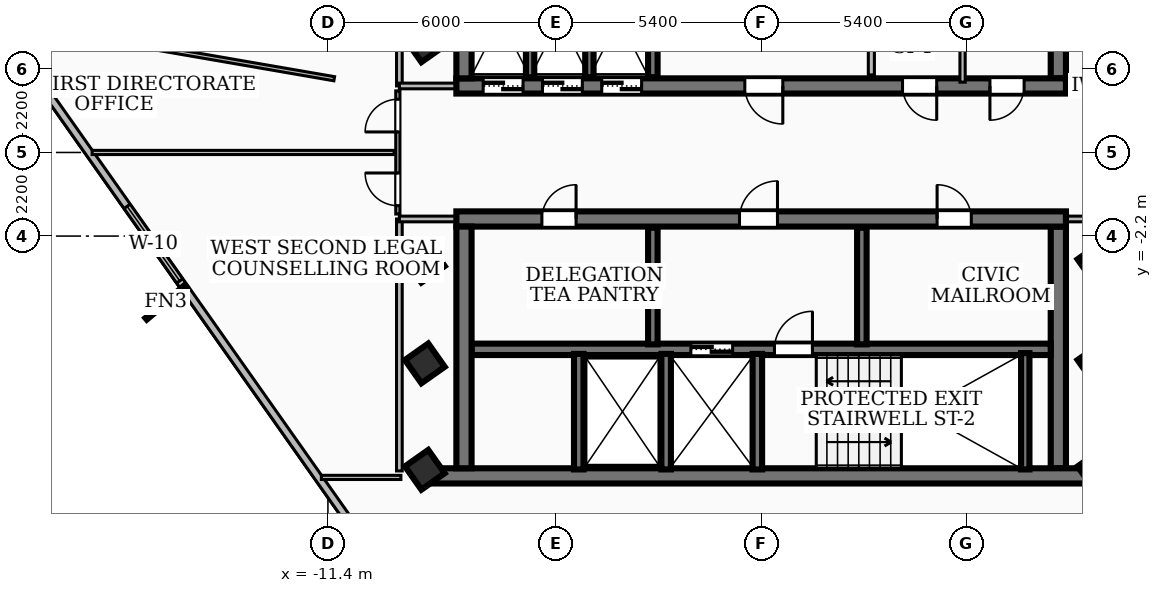
"""IFC4 building model, lengths in metres.
Left out: names, types, materials, properties, quantities, classifications, styles, units other than length and angle.
Written with IfcOpenShell. Run it as: python <this file> out.ifc"""

import sys

from ifc_helpers import new_model, si_unit, direction, frame, frame_2d, origin, origin_2d, place, context, subcontext, project, spatial, rectangle, extrude, element, fill, save


model = new_model("IFC4")
c1 = context("Model", 3, precision=1e-05, world=origin(), true_north=direction((0.0, 1.0)))
c2 = subcontext(c1, "Body", "Model", "MODEL_VIEW")
j1 = project(units=[si_unit("LENGTHUNIT", "METRE"), si_unit("PLANEANGLEUNIT", "RADIAN")], contexts=[c1])
p1 = place(None, origin())
s1 = spatial("IfcSite", under=j1, at=p1, CompositionType="ELEMENT")
p2 = place(p1, origin())
s2 = spatial("IfcBuilding", under=s1, at=p2, CompositionType="ELEMENT")
p3 = place(p2, frame((0.0, 0.0, 225.72)))
s3 = spatial("IfcBuildingStorey", under=s2, at=p3, CompositionType="ELEMENT", Elevation=225.72)
p4 = place(p3, frame((8.02, 1.75, 0.0), z_axis=(0.0, 0.0, 1.0), x_axis=(-1.0, 0.0, 0.0)))
e1 = element("IfcWall", 1, at=p4, inside=s3, PredefinedType="SHEAR", context=c2, shape_type="SweptSolid", body=[
    extrude(rectangle(XDim=16.04, YDim=0.4, at=frame_2d((8.02, 0.0))), origin(), (0.0, 0.0, 1.0), 3.14),
])
p5 = place(p4, frame((7.45, 0.0, 0.0)))
e2 = element("IfcOpeningElement", 2, at=p5, cuts=e1, PredefinedType="OPENING", context=c2, shape_type="SweptSolid", body=[
    extrude(rectangle(XDim=1.0, YDim=2.1, at=frame_2d((0.5, 1.05))), frame((0.0, 0.21, 0.0), z_axis=(0.0, -1.0, 0.0), x_axis=(1.0, 0.0, 0.0)), (0.0, 0.0, 1.0), 0.42),
])
p6 = place(p4, frame((14.285, 0.0, 0.0)))
e3 = element("IfcOpeningElement", 3, at=p6, cuts=e1, PredefinedType="OPENING", context=c2, shape_type="SweptSolid", body=[
    extrude(rectangle(XDim=1.05, YDim=2.15, at=frame_2d((0.525, 1.075))), frame((0.0, 0.21, 0.0), z_axis=(0.0, -1.0, 0.0), x_axis=(1.0, 0.0, 0.0)), (0.0, 0.0, 1.0), 0.42),
])
p7 = place(p4, frame((12.725, 0.0, 0.0)))
e4 = element("IfcOpeningElement", 4, at=p7, cuts=e1, PredefinedType="OPENING", context=c2, shape_type="SweptSolid", body=[
    extrude(rectangle(XDim=1.05, YDim=2.15, at=frame_2d((0.525, 1.075))), frame((0.0, 0.21, 0.0), z_axis=(0.0, -1.0, 0.0), x_axis=(1.0, 0.0, 0.0)), (0.0, 0.0, 1.0), 0.42),
])
p8 = place(p4, frame((11.165, 0.0, 0.0)))
e5 = element("IfcOpeningElement", 5, at=p8, cuts=e1, PredefinedType="OPENING", context=c2, shape_type="SweptSolid", body=[
    extrude(rectangle(XDim=1.05, YDim=2.15, at=frame_2d((0.525, 1.075))), frame((0.0, 0.21, 0.0), z_axis=(0.0, -1.0, 0.0), x_axis=(1.0, 0.0, 0.0)), (0.0, 0.0, 1.0), 0.42),
])
p9 = place(p4, frame((3.4, 0.0, 0.0)))
e6 = element("IfcOpeningElement", 6, at=p9, cuts=e1, PredefinedType="OPENING", context=c2, shape_type="SweptSolid", body=[
    extrude(rectangle(XDim=0.9, YDim=2.06, at=frame_2d((0.45, 1.03))), frame((0.0, 0.21, 0.0), z_axis=(0.0, -1.0, 0.0), x_axis=(1.0, 0.0, 0.0)), (0.0, 0.0, 1.0), 0.42),
])
p10 = place(p4, frame((1.1, 0.0, 0.0)))
e7 = element("IfcOpeningElement", 7, at=p10, cuts=e1, PredefinedType="OPENING", context=c2, shape_type="SweptSolid", body=[
    extrude(rectangle(XDim=0.9, YDim=2.06, at=frame_2d((0.45, 1.03))), frame((0.0, 0.21, 0.0), z_axis=(0.0, -1.0, 0.0), x_axis=(1.0, 0.0, 0.0)), (0.0, 0.0, 1.0), 0.42),
])
for number, where, z_axis, x_axis in (
    (8, (-7.82, 1.95, 0.0), (0.0, 0.0, 1.0), (0.0, 1.0, 0.0)),
    (9, (7.82, 8.31, 0.0), (0.0, 0.0, 1.0), (0.0, -1.0, 0.0)),
):
    element("IfcWall", number, at=place(p3, frame(where, z_axis=z_axis, x_axis=x_axis)), inside=s3, PredefinedType="SHEAR", context=c2, shape_type="SweptSolid", body=[
        extrude(rectangle(XDim=6.36, YDim=0.4, at=frame_2d((3.18, 0.0))), origin(), (0.0, 0.0, 1.0), 3.14),
    ])
p11 = place(p3, frame((8.78, -8.51, 0.0), z_axis=(0.0, 0.0, 1.0), x_axis=(-1.0, 0.0, 0.0)))
e10 = element("IfcWall", 10, at=p11, inside=s3, PredefinedType="SHEAR", context=c2, shape_type="SweptSolid", body=[
    extrude(rectangle(XDim=17.56, YDim=0.4, at=frame_2d((8.78, 0.0))), origin(), (0.0, 0.0, 1.0), 3.14),
])
p12 = place(p3, frame((-8.02, -1.75, 0.0), z_axis=(0.0, 0.0, 1.0), x_axis=(1.0, 0.0, 0.0)))
e11 = element("IfcWall", 11, at=p12, inside=s3, PredefinedType="SHEAR", context=c2, shape_type="SweptSolid", body=[
    extrude(rectangle(XDim=16.04, YDim=0.4, at=frame_2d((8.02, 0.0))), origin(), (0.0, 0.0, 1.0), 3.14),
])
p13 = place(p12, frame((7.45, 0.0, 0.0)))
e12 = element("IfcOpeningElement", 12, at=p13, cuts=e11, PredefinedType="OPENING", context=c2, shape_type="SweptSolid", body=[
    extrude(rectangle(XDim=1.0, YDim=2.1, at=frame_2d((0.5, 1.05))), frame((0.0, 0.21, 0.0), z_axis=(0.0, -1.0, 0.0), x_axis=(1.0, 0.0, 0.0)), (0.0, 0.0, 1.0), 0.42),
])
p14 = place(p12, frame((12.65, 0.0, 0.0)))
e13 = element("IfcOpeningElement", 13, at=p14, cuts=e11, PredefinedType="OPENING", context=c2, shape_type="SweptSolid", body=[
    extrude(rectangle(XDim=0.9, YDim=2.06, at=frame_2d((0.45, 1.03))), frame((0.0, 0.21, 0.0), z_axis=(0.0, -1.0, 0.0), x_axis=(1.0, 0.0, 0.0)), (0.0, 0.0, 1.0), 0.42),
])
p15 = place(p12, frame((2.25, 0.0, 0.0)))
e14 = element("IfcOpeningElement", 14, at=p15, cuts=e11, PredefinedType="OPENING", context=c2, shape_type="SweptSolid", body=[
    extrude(rectangle(XDim=0.9, YDim=2.06, at=frame_2d((0.45, 1.03))), frame((0.0, 0.21, 0.0), z_axis=(0.0, -1.0, 0.0), x_axis=(1.0, 0.0, 0.0)), (0.0, 0.0, 1.0), 0.42),
])
for number, where, z_axis, x_axis in (
    (15, (-7.82, -8.31, 0.0), (0.0, 0.0, 1.0), (0.0, 1.0, 0.0)),
    (16, (7.82, -1.95, 0.0), (0.0, 0.0, 1.0), (0.0, -1.0, 0.0)),
):
    element("IfcWall", number, at=place(p3, frame(where, z_axis=z_axis, x_axis=x_axis)), inside=s3, PredefinedType="SHEAR", context=c2, shape_type="SweptSolid", body=[
        extrude(rectangle(XDim=6.36, YDim=0.4, at=frame_2d((3.18, 0.0))), origin(), (0.0, 0.0, 1.0), 3.14),
    ])
p16 = place(p3, frame((-7.62, -5.18, 0.0), z_axis=(0.0, 0.0, 1.0), x_axis=(1.0, 0.0, 0.0)))
e17 = element("IfcWall", 17, at=p16, inside=s3, PredefinedType="SOLIDWALL", context=c2, shape_type="SweptSolid", body=[
    extrude(rectangle(XDim=15.24, YDim=0.3, at=frame_2d((7.62, 0.0))), origin(), (0.0, 0.0, 1.0), 3.14),
])
p17 = place(p16, frame((5.77, 0.0, 0.0)))
e18 = element("IfcOpeningElement", 18, at=p17, cuts=e17, PredefinedType="OPENING", context=c2, shape_type="SweptSolid", body=[
    extrude(rectangle(XDim=1.1, YDim=2.15, at=frame_2d((0.55, 1.075))), frame((0.0, 0.16, 0.0), z_axis=(0.0, -1.0, 0.0), x_axis=(1.0, 0.0, 0.0)), (0.0, 0.0, 1.0), 0.32),
])
p18 = place(p16, frame((7.97, 0.0, 0.0)))
e19 = element("IfcOpeningElement", 19, at=p18, cuts=e17, PredefinedType="OPENING", context=c2, shape_type="SweptSolid", body=[
    extrude(rectangle(XDim=1.0, YDim=2.1, at=frame_2d((0.5, 1.05))), frame((0.0, 0.16, 0.0), z_axis=(0.0, -1.0, 0.0), x_axis=(1.0, 0.0, 0.0)), (0.0, 0.0, 1.0), 0.32),
])
p19 = place(p3, frame((6.95, -8.34, 0.0), z_axis=(0.0, 0.0, 1.0), x_axis=(0.0, 1.0, 0.0)))
e20 = element("IfcWall", 20, at=p19, inside=s3, PredefinedType="SOLIDWALL", context=c2, shape_type="SweptSolid", body=[
    extrude(rectangle(XDim=3.06, YDim=0.22, at=frame_2d((1.53, 0.0))), origin(), (0.0, 0.0, 1.0), 3.14),
])
p20 = place(p3, frame((-2.85, 1.98, 0.0), z_axis=(0.0, 0.0, 1.0), x_axis=(0.0, 1.0, 0.0)))
e21 = element("IfcWall", 21, at=p20, inside=s3, PredefinedType="SOLIDWALL", context=c2, shape_type="SweptSolid", body=[
    extrude(rectangle(XDim=3.07, YDim=0.25, at=frame_2d((1.535, 0.0))), origin(), (0.0, 0.0, 1.0), 3.14),
])
for number, where, z_axis, x_axis in (
    (22, (-0.1, -8.34, 0.0), (0.0, 0.0, 1.0), (0.0, 1.0, 0.0)),
    (23, (-2.5, -8.34, 0.0), (0.0, 0.0, 1.0), (0.0, 1.0, 0.0)),
    (24, (-4.8, -8.34, 0.0), (0.0, 0.0, 1.0), (0.0, 1.0, 0.0)),
):
    element("IfcWall", number, at=place(p3, frame(where, z_axis=z_axis, x_axis=x_axis)), inside=s3, PredefinedType="SOLIDWALL", context=c2, shape_type="SweptSolid", body=[
        extrude(rectangle(XDim=3.04, YDim=0.25, at=frame_2d((1.52, 0.0))), origin(), (0.0, 0.0, 1.0), 3.14),
    ])
for number, where, z_axis, x_axis in (
    (25, (-2.85, -5.05, 0.0), (0.0, 0.0, 1.0), (0.0, 1.0, 0.0)),
    (26, (2.65, -5.05, 0.0), (0.0, 0.0, 1.0), (0.0, 1.0, 0.0)),
):
    element("IfcWall", number, at=place(p3, frame(where, z_axis=z_axis, x_axis=x_axis)), inside=s3, PredefinedType="SOLIDWALL", context=c2, shape_type="SweptSolid", body=[
        extrude(rectangle(XDim=3.07, YDim=0.25, at=frame_2d((1.535, 0.0))), origin(), (0.0, 0.0, 1.0), 3.14),
    ])
for number, where, z_axis, x_axis in (
    (27, (-6.08, 1.98, 0.0), (0.0, 0.0, 1.0), (0.0, 1.0, 0.0)),
    (28, (-4.52, 1.98, 0.0), (0.0, 0.0, 1.0), (0.0, 1.0, 0.0)),
):
    element("IfcWall", number, at=place(p3, frame(where, z_axis=z_axis, x_axis=x_axis)), inside=s3, PredefinedType="SOLIDWALL", context=c2, shape_type="SweptSolid", body=[
        extrude(rectangle(XDim=3.07, YDim=0.22, at=frame_2d((1.535, 0.0))), origin(), (0.0, 0.0, 1.0), 3.14),
    ])
for number, where, z_axis, x_axis in (
    (29, (-8.85, -5.55, 0.0), (0.0, 0.0, 1.0), (0.817, 0.576, 0.0)),
    (30, (-8.85, -2.9, 0.0), (0.0, 0.0, 1.0), (0.817, 0.576, 0.0)),
    (31, (-8.85, 2.9, 0.0), (0.0, 0.0, 1.0), (0.817, 0.576, 0.0)),
    (32, (8.85, -5.55, 0.0), (0.0, 0.0, 1.0), (0.817, 0.576, 0.0)),
    (33, (8.85, -2.9, 0.0), (0.0, 0.0, 1.0), (0.817, 0.576, 0.0)),
    (34, (8.85, 2.9, 0.0), (0.0, 0.0, 1.0), (0.817, 0.576, 0.0)),
    (35, (8.85, -8.35, 0.0), (0.0, 0.0, 1.0), (0.817, 0.576, 0.0)),
    (36, (-8.85, -8.35, 0.0), (0.0, 0.0, 1.0), (0.817, 0.576, 0.0)),
):
    element("IfcColumn", number, at=place(p3, frame(where, z_axis=z_axis, x_axis=x_axis)), inside=s3, PredefinedType="COLUMN", context=c2, shape_type="SweptSolid", body=[
        extrude(rectangle(XDim=0.75, YDim=0.75, at=origin_2d()), origin(), (0.0, 0.0, 1.0), 3.42),
    ])
p21 = place(p3, frame((-4.337, -18.921, 0.0), z_axis=(0.0, 0.0, 1.0), x_axis=(-0.576413609547, 0.817158094085, 0.0)))
e37 = element("IfcWall", 37, at=p21, inside=s3, PredefinedType="SOLIDWALL", context=c2, shape_type="SweptSolid", body=[
    extrude(rectangle(XDim=25.923, YDim=0.2, at=frame_2d((12.961, 0.0))), origin(), (0.0, 0.0, 1.0), 3.14),
])
p22 = place(p21, frame((19.02, 0.0, 0.85)))
e38 = element("IfcOpeningElement", 38, at=p22, cuts=e37, PredefinedType="OPENING", context=c2, shape_type="SweptSolid", body=[
    extrude(rectangle(XDim=2.4, YDim=1.65, at=frame_2d((1.2, 0.825))), frame((0.0, 0.11, 0.0), z_axis=(0.0, -1.0, 0.0), x_axis=(1.0, 0.0, 0.0)), (0.0, 0.0, 1.0), 0.22),
])
p23 = place(p3, frame((2.9, 2.04, 0.0), z_axis=(0.0, 0.0, 1.0), x_axis=(0.0, 1.0, 0.0)))
e39 = element("IfcWall", 39, at=p23, inside=s3, PredefinedType="PARTITIONING", context=c2, shape_type="SweptSolid", body=[
    extrude(rectangle(XDim=2.94, YDim=0.16, at=frame_2d((1.47, 0.0))), origin(), (0.0, 0.0, 1.0), 2.37),
])
p24 = place(p23, frame((1.82, 0.0, 0.0)))
e40 = element("IfcOpeningElement", 40, at=p24, cuts=e39, PredefinedType="OPENING", context=c2, shape_type="SweptSolid", body=[
    extrude(rectangle(XDim=0.9, YDim=2.06, at=frame_2d((0.45, 1.03))), frame((0.0, 0.09, 0.0), z_axis=(0.0, -1.0, 0.0), x_axis=(1.0, 0.0, 0.0)), (0.0, 0.0, 1.0), 0.18),
])
p25 = place(p3, frame((5.3, 1.85, 0.0), z_axis=(0.0, 0.0, 1.0), x_axis=(0.0, 1.0, 0.0)))
e41 = element("IfcWall", 41, at=p25, inside=s3, PredefinedType="PARTITIONING", context=c2, shape_type="SweptSolid", body=[
    extrude(rectangle(XDim=1.89, YDim=0.138, at=frame_2d((0.945, 0.0))), origin(), (0.0, 0.0, 1.0), 2.37),
])
p26 = place(p3, frame((-9.52, 1.75, 0.0), z_axis=(0.0, 0.0, 1.0), x_axis=(0.0, 1.0, 0.0)))
e42 = element("IfcWall", 42, at=p26, inside=s3, PredefinedType="PARTITIONING", context=c2, shape_type="SweptSolid", body=[
    extrude(rectangle(XDim=6.63, YDim=0.15, at=frame_2d((3.315, 0.0))), origin(), (0.0, 0.0, 1.0), 3.14),
])
p27 = place(p3, frame((-7.85, 1.75, 0.0), z_axis=(0.0, 0.0, 1.0), x_axis=(-1.0, 0.0, 0.0)))
e43 = element("IfcWall", 43, at=p27, inside=s3, PredefinedType="PARTITIONING", context=c2, shape_type="SweptSolid", body=[
    extrude(rectangle(XDim=1.67, YDim=0.15, at=frame_2d((0.835, 0.0))), origin(), (0.0, 0.0, 1.0), 2.37),
])
p28 = place(p3, frame((-9.52, -8.38, 0.0), z_axis=(0.0, 0.0, 1.0), x_axis=(0.0, 1.0, 0.0)))
e44 = element("IfcWall", 44, at=p28, inside=s3, PredefinedType="PARTITIONING", context=c2, shape_type="SweptSolid", body=[
    extrude(rectangle(XDim=6.63, YDim=0.15, at=frame_2d((3.315, 0.0))), origin(), (0.0, 0.0, 1.0), 3.14),
])
for number, where, z_axis, x_axis in (
    (45, (-7.85, -1.75, 0.0), (0.0, 0.0, 1.0), (-1.0, 0.0, 0.0)),
    (46, (7.85, 1.75, 0.0), (0.0, 0.0, 1.0), (1.0, 0.0, 0.0)),
    (47, (7.85, -1.75, 0.0), (0.0, 0.0, 1.0), (1.0, 0.0, 0.0)),
):
    element("IfcWall", number, at=place(p3, frame(where, z_axis=z_axis, x_axis=x_axis)), inside=s3, PredefinedType="PARTITIONING", context=c2, shape_type="SweptSolid", body=[
        extrude(rectangle(XDim=1.67, YDim=0.15, at=frame_2d((0.835, 0.0))), origin(), (0.0, 0.0, 1.0), 2.37),
    ])
p29 = place(p3, frame((-17.604, 0.0, 0.0), z_axis=(0.0, 0.0, 1.0), x_axis=(1.0, 0.0, 0.0)))
e48 = element("IfcWall", 48, at=p29, inside=s3, PredefinedType="PARTITIONING", context=c2, shape_type="SweptSolid", body=[
    extrude(rectangle(XDim=7.944, YDim=0.11, at=frame_2d((3.972, 0.0))), origin(), (0.0, 0.0, 1.0), 3.14),
])
p30 = place(p3, frame((-11.573, -8.55, 0.0), z_axis=(0.0, 0.0, 1.0), x_axis=(1.0, 0.0, 0.0)))
e49 = element("IfcWall", 49, at=p30, inside=s3, PredefinedType="PARTITIONING", context=c2, shape_type="SweptSolid", body=[
    extrude(rectangle(XDim=2.093, YDim=0.11, at=frame_2d((1.046, 0.0))), origin(), (0.0, 0.0, 1.0), 3.14),
])
p31 = place(p3, frame((-9.56, -1.62, 0.0), z_axis=(0.0, 0.0, 1.0), x_axis=(0.0, 1.0, 0.0)))
e50 = element("IfcWall", 50, at=p31, inside=s3, PredefinedType="PARTITIONING", context=c2, shape_type="SweptSolid", body=[
    extrude(rectangle(XDim=3.24, YDim=0.11, at=frame_2d((1.62, 0.0))), origin(), (0.0, 0.0, 1.0), 3.14),
])
p32 = place(p31, frame((0.22, 0.0, 0.0)))
e51 = element("IfcOpeningElement", 51, at=p32, cuts=e50, PredefinedType="OPENING", context=c2, shape_type="SweptSolid", body=[
    extrude(rectangle(XDim=0.86, YDim=2.04, at=frame_2d((0.43, 1.02))), frame((0.0, 0.065, 0.0), z_axis=(0.0, -1.0, 0.0), x_axis=(1.0, 0.0, 0.0)), (0.0, 0.0, 1.0), 0.13),
])
p33 = place(p31, frame((2.16, 0.0, 0.0)))
e52 = element("IfcOpeningElement", 52, at=p33, cuts=e50, PredefinedType="OPENING", context=c2, shape_type="SweptSolid", body=[
    extrude(rectangle(XDim=0.86, YDim=2.04, at=frame_2d((0.43, 1.02))), frame((0.0, 0.065, 0.0), z_axis=(0.0, -1.0, 0.0), x_axis=(1.0, 0.0, 0.0)), (0.0, 0.0, 1.0), 0.13),
])
p34 = place(p3, frame((-11.234, 1.94, 0.0), z_axis=(0.0, 0.0, 1.0), x_axis=(-0.985400402951, 0.170252887973, 0.0)))
e53 = element("IfcWall", 53, at=p34, inside=s3, PredefinedType="PARTITIONING", context=c2, shape_type="SweptSolid", body=[
    extrude(rectangle(XDim=8.294, YDim=0.11, at=frame_2d((4.147, 0.0))), origin(), (0.0, 0.0, 1.0), 3.14),
])
p35 = place(p3, frame((16.752, -5.671, 0.0), z_axis=(0.0, 0.0, 1.0), x_axis=(-0.81715881447, -0.576412588285, 0.0)))
e54 = element("IfcWall", 54, at=p35, inside=s3, PredefinedType="PARTITIONING", context=c2, shape_type="SweptSolid", body=[
    extrude(rectangle(XDim=20.44, YDim=0.11, at=frame_2d((10.22, 0.0))), origin(), (0.0, 0.0, 1.0), 2.51),
])
p36 = place(p35, frame((9.82, 0.0, 0.0)))
e55 = element("IfcOpeningElement", 55, at=p36, cuts=e54, PredefinedType="OPENING", context=c2, shape_type="SweptSolid", body=[
    extrude(rectangle(XDim=1.2, YDim=2.1, at=frame_2d((0.6, 1.05))), frame((0.0, 0.065, 0.0), z_axis=(0.0, -1.0, 0.0), x_axis=(1.0, 0.0, 0.0)), (0.0, 0.0, 1.0), 0.13),
])
p37 = place(p3, frame((3.766, -16.85, 0.0), z_axis=(0.0, 0.0, 1.0), x_axis=(0.817131323803, 0.576451558815, 0.0)))
e56 = element("IfcWall", 56, at=p37, inside=s3, PredefinedType="PARTITIONING", context=c2, shape_type="SweptSolid", body=[
    extrude(rectangle(XDim=12.87, YDim=0.11, at=frame_2d((6.435, 0.0))), origin(), (0.0, 0.0, 1.0), 2.51),
])
p38 = place(p37, frame((6.185, 0.0, 0.0)))
e57 = element("IfcOpeningElement", 57, at=p38, cuts=e56, PredefinedType="OPENING", context=c2, shape_type="SweptSolid", body=[
    extrude(rectangle(XDim=0.86, YDim=2.04, at=frame_2d((0.43, 1.02))), frame((0.0, 0.065, 0.0), z_axis=(0.0, -1.0, 0.0), x_axis=(1.0, 0.0, 0.0)), (0.0, 0.0, 1.0), 0.13),
])
p39 = place(p37, frame((7.625, 0.0, 0.0)))
e58 = element("IfcOpeningElement", 58, at=p39, cuts=e56, PredefinedType="OPENING", context=c2, shape_type="SweptSolid", body=[
    extrude(rectangle(XDim=0.86, YDim=2.04, at=frame_2d((0.43, 1.02))), frame((0.0, 0.065, 0.0), z_axis=(0.0, -1.0, 0.0), x_axis=(1.0, 0.0, 0.0)), (0.0, 0.0, 1.0), 0.13),
])
p40 = place(p22, origin())
e59 = element("IfcWindow", 59, at=p40, inside=s3, PartitioningType="SINGLE_PANEL", PredefinedType="WINDOW", context=c2, shape_type="SweptSolid", body=[
    extrude(rectangle(XDim=2.4, YDim=1.65, at=frame_2d((1.2, 0.825))), frame((0.0, 0.03, 0.0), z_axis=(0.0, -1.0, 0.0), x_axis=(1.0, 0.0, 0.0)), (0.0, 0.0, 1.0), 0.06),
])
fill(e38, e59)
p41 = place(p5, origin())
e60 = element("IfcDoor", 60, at=p41, inside=s3, OperationType="SINGLE_SWING_LEFT", PredefinedType="DOOR", context=c2, shape_type="SweptSolid", body=[
    extrude(rectangle(XDim=1.0, YDim=2.1, at=frame_2d((0.5, 1.05))), frame((0.0, 0.025, 0.0), z_axis=(0.0, -1.0, 0.0), x_axis=(1.0, 0.0, 0.0)), (0.0, 0.0, 1.0), 0.05),
])
fill(e2, e60)
p42 = place(p13, origin())
e61 = element("IfcDoor", 61, at=p42, inside=s3, OperationType="SINGLE_SWING_RIGHT", PredefinedType="DOOR", context=c2, shape_type="SweptSolid", body=[
    extrude(rectangle(XDim=1.0, YDim=2.1, at=frame_2d((0.5, 1.05))), frame((0.0, 0.025, 0.0), z_axis=(0.0, -1.0, 0.0), x_axis=(1.0, 0.0, 0.0)), (0.0, 0.0, 1.0), 0.05),
])
fill(e12, e61)
p43 = place(p17, origin())
e62 = element("IfcDoor", 62, at=p43, inside=s3, OperationType="DOUBLE_DOOR_SLIDING", PredefinedType="DOOR", context=c2, shape_type="SweptSolid", body=[
    extrude(rectangle(XDim=1.1, YDim=2.15, at=frame_2d((0.55, 1.075))), frame((0.0, 0.025, 0.0), z_axis=(0.0, -1.0, 0.0), x_axis=(1.0, 0.0, 0.0)), (0.0, 0.0, 1.0), 0.05),
])
fill(e18, e62)
p44 = place(p18, origin())
e63 = element("IfcDoor", 63, at=p44, inside=s3, OperationType="SINGLE_SWING_RIGHT", PredefinedType="DOOR", context=c2, shape_type="SweptSolid", body=[
    extrude(rectangle(XDim=1.0, YDim=2.1, at=frame_2d((0.5, 1.05))), frame((0.0, 0.025, 0.0), z_axis=(0.0, -1.0, 0.0), x_axis=(1.0, 0.0, 0.0)), (0.0, 0.0, 1.0), 0.05),
])
fill(e19, e63)
p45 = place(p6, origin())
e64 = element("IfcDoor", 64, at=p45, inside=s3, OperationType="DOUBLE_DOOR_SLIDING", PredefinedType="DOOR", context=c2, shape_type="SweptSolid", body=[
    extrude(rectangle(XDim=1.05, YDim=2.15, at=frame_2d((0.525, 1.075))), frame((0.0, 0.025, 0.0), z_axis=(0.0, -1.0, 0.0), x_axis=(1.0, 0.0, 0.0)), (0.0, 0.0, 1.0), 0.05),
])
fill(e3, e64)
p46 = place(p7, origin())
e65 = element("IfcDoor", 65, at=p46, inside=s3, OperationType="DOUBLE_DOOR_SLIDING", PredefinedType="DOOR", context=c2, shape_type="SweptSolid", body=[
    extrude(rectangle(XDim=1.05, YDim=2.15, at=frame_2d((0.525, 1.075))), frame((0.0, 0.025, 0.0), z_axis=(0.0, -1.0, 0.0), x_axis=(1.0, 0.0, 0.0)), (0.0, 0.0, 1.0), 0.05),
])
fill(e4, e65)
p47 = place(p8, origin())
e66 = element("IfcDoor", 66, at=p47, inside=s3, OperationType="DOUBLE_DOOR_SLIDING", PredefinedType="DOOR", context=c2, shape_type="SweptSolid", body=[
    extrude(rectangle(XDim=1.05, YDim=2.15, at=frame_2d((0.525, 1.075))), frame((0.0, 0.025, 0.0), z_axis=(0.0, -1.0, 0.0), x_axis=(1.0, 0.0, 0.0)), (0.0, 0.0, 1.0), 0.05),
])
fill(e5, e66)
p48 = place(p14, origin())
e67 = element("IfcDoor", 67, at=p48, inside=s3, OperationType="SINGLE_SWING_LEFT", PredefinedType="DOOR", context=c2, shape_type="SweptSolid", body=[
    extrude(rectangle(XDim=0.9, YDim=2.06, at=frame_2d((0.45, 1.03))), frame((0.0, 0.025, 0.0), z_axis=(0.0, -1.0, 0.0), x_axis=(1.0, 0.0, 0.0)), (0.0, 0.0, 1.0), 0.05),
])
fill(e13, e67)
p49 = place(p15, origin())
e68 = element("IfcDoor", 68, at=p49, inside=s3, OperationType="SINGLE_SWING_RIGHT", PredefinedType="DOOR", context=c2, shape_type="SweptSolid", body=[
    extrude(rectangle(XDim=0.9, YDim=2.06, at=frame_2d((0.45, 1.03))), frame((0.0, 0.025, 0.0), z_axis=(0.0, -1.0, 0.0), x_axis=(1.0, 0.0, 0.0)), (0.0, 0.0, 1.0), 0.05),
])
fill(e14, e68)
p50 = place(p9, origin())
e69 = element("IfcDoor", 69, at=p50, inside=s3, OperationType="SINGLE_SWING_LEFT", PredefinedType="DOOR", context=c2, shape_type="SweptSolid", body=[
    extrude(rectangle(XDim=0.9, YDim=2.06, at=frame_2d((0.45, 1.03))), frame((0.0, 0.025, 0.0), z_axis=(0.0, -1.0, 0.0), x_axis=(1.0, 0.0, 0.0)), (0.0, 0.0, 1.0), 0.05),
])
fill(e6, e69)
p51 = place(p10, origin())
e70 = element("IfcDoor", 70, at=p51, inside=s3, OperationType="SINGLE_SWING_RIGHT", PredefinedType="DOOR", context=c2, shape_type="SweptSolid", body=[
    extrude(rectangle(XDim=0.9, YDim=2.06, at=frame_2d((0.45, 1.03))), frame((0.0, 0.025, 0.0), z_axis=(0.0, -1.0, 0.0), x_axis=(1.0, 0.0, 0.0)), (0.0, 0.0, 1.0), 0.05),
])
fill(e7, e70)
p52 = place(p32, origin())
e71 = element("IfcDoor", 71, at=p52, inside=s3, OperationType="SINGLE_SWING_RIGHT", PredefinedType="DOOR", context=c2, shape_type="SweptSolid", body=[
    extrude(rectangle(XDim=0.86, YDim=2.04, at=frame_2d((0.43, 1.02))), frame((0.0, 0.025, 0.0), z_axis=(0.0, -1.0, 0.0), x_axis=(1.0, 0.0, 0.0)), (0.0, 0.0, 1.0), 0.05),
])
fill(e51, e71)
p53 = place(p33, origin())
e72 = element("IfcDoor", 72, at=p53, inside=s3, OperationType="SINGLE_SWING_LEFT", PredefinedType="DOOR", context=c2, shape_type="SweptSolid", body=[
    extrude(rectangle(XDim=0.86, YDim=2.04, at=frame_2d((0.43, 1.02))), frame((0.0, 0.025, 0.0), z_axis=(0.0, -1.0, 0.0), x_axis=(1.0, 0.0, 0.0)), (0.0, 0.0, 1.0), 0.05),
])
fill(e52, e72)
save(model, sys.argv[1])
